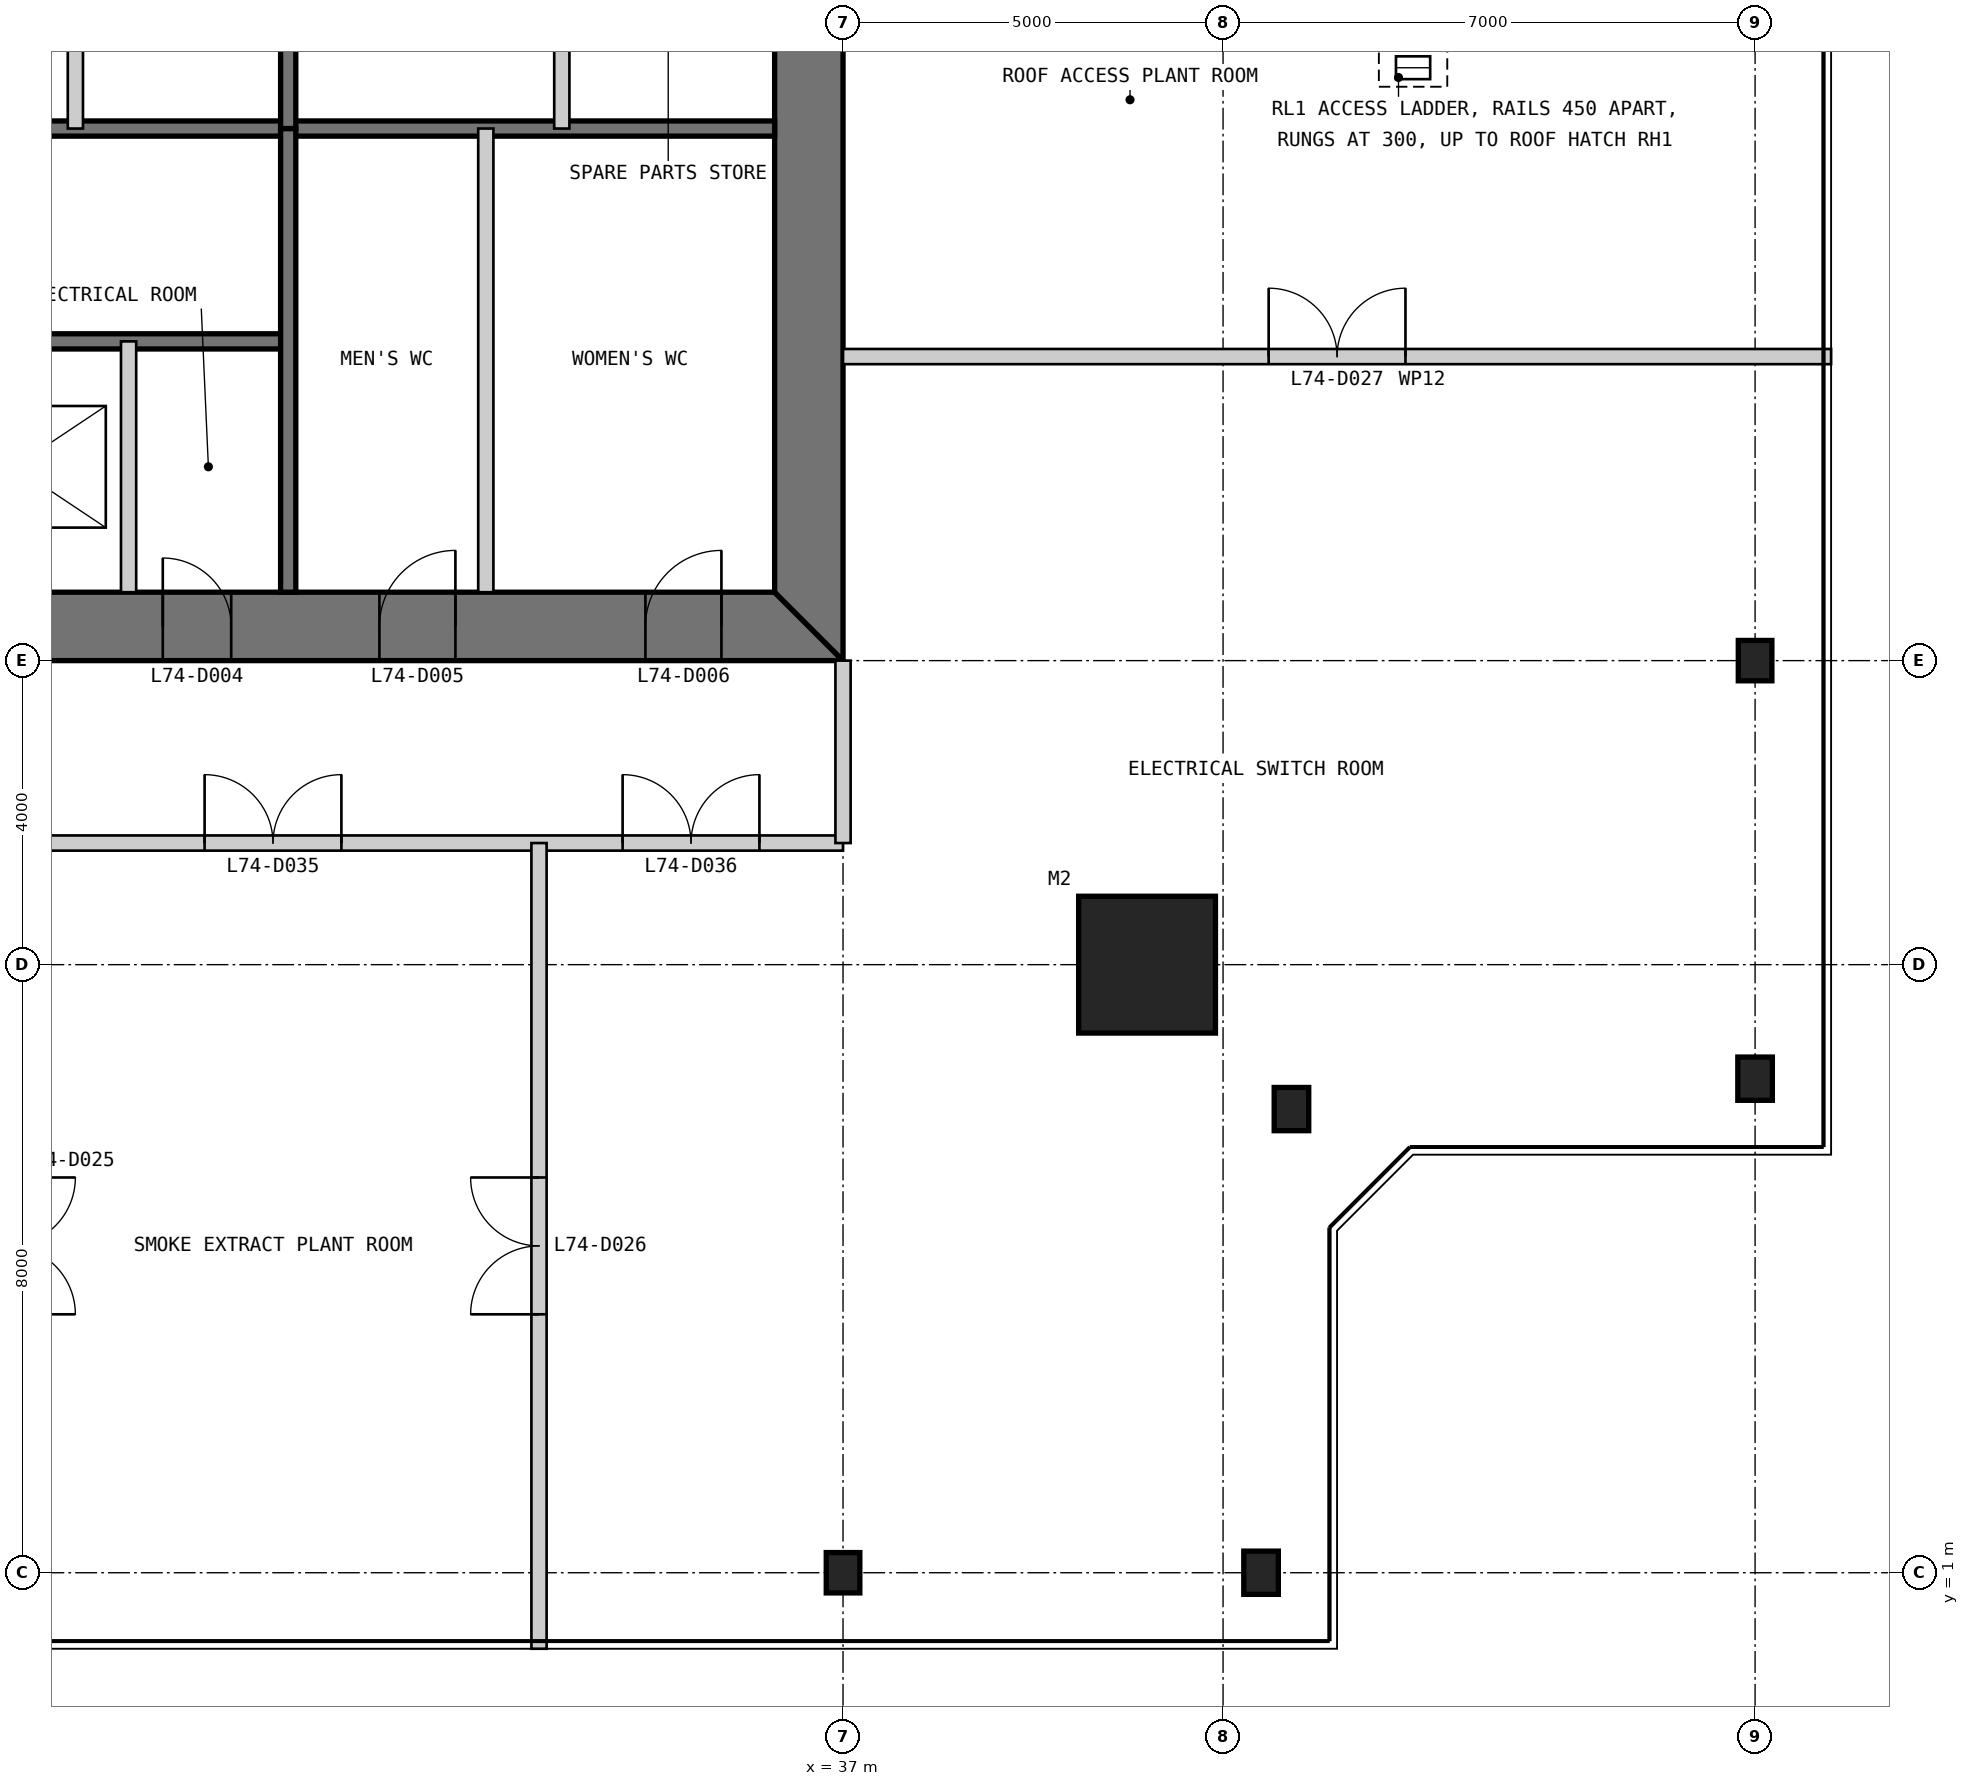
"""IFC4 building model, lengths in metres.
Left out: names, types, materials, properties, quantities, classifications, styles, units other than length and angle.
Written with IfcOpenShell. Run it as: python <this file> out.ifc"""

import sys

from ifc_helpers import new_model, si_unit, direction, frame, frame_2d, origin, origin_2d, place, context, subcontext, project, spatial, polyline, rectangle, i_section, outline, extrude, element, fill, save


model = new_model("IFC4")
c1 = context("Model", 3, precision=1e-05, world=origin(), true_north=direction((0.0, 1.0)))
c2 = subcontext(c1, "Body", "Model", "MODEL_VIEW")
j1 = project(units=[si_unit("LENGTHUNIT", "METRE"), si_unit("PLANEANGLEUNIT", "RADIAN")], contexts=[c1])
p1 = place(None, origin())
s1 = spatial("IfcSite", under=j1, at=p1, CompositionType="ELEMENT")
p2 = place(p1, origin())
s2 = spatial("IfcBuilding", under=s1, at=p2, CompositionType="ELEMENT")
p3 = place(p2, frame((0.0, 0.0, 307.8)))
s3 = spatial("IfcBuildingStorey", under=s2, at=p3, CompositionType="ELEMENT", Elevation=307.8)
p4 = place(p3, frame((41.0, 9.0, 0.0), z_axis=(0.0, 0.0, 1.0), x_axis=(1.0, 0.0, 0.0)))
e1 = element("IfcColumn", 1, at=p4, inside=s3, PredefinedType="COLUMN", context=c2, shape_type="SweptSolid", body=[
    extrude(rectangle(XDim=1.8, YDim=1.8, at=origin_2d()), origin(), (0.0, 0.0, 1.0), 5.75),
])
p5 = place(p3, frame((37.0, 1.0, 0.0), z_axis=(0.0, 0.0, 1.0), x_axis=(1.0, 0.0, 0.0)))
e2 = element("IfcColumn", 2, at=p5, inside=s3, PredefinedType="COLUMN", context=c2, shape_type="SweptSolid", body=[
    extrude(i_section(OverallWidth=0.442, OverallDepth=0.531, WebThickness=0.066, FlangeThickness=0.106, at=origin_2d()), origin(), (0.0, 0.0, 1.0), 5.75),
])
for number, where, z_axis, x_axis in (
    (3, (42.5, 1.0, 0.0), (0.0, 0.0, 1.0), (1.0, 0.0, 0.0)),
    (4, (42.9, 7.1, 0.0), (0.0, 0.0, 1.0), (1.0, 0.0, 0.0)),
    (5, (49.0, 7.5, 0.0), (0.0, 0.0, 1.0), (1.0, 0.0, 0.0)),
):
    element("IfcColumn", number, at=place(p3, frame(where, z_axis=z_axis, x_axis=x_axis)), inside=s3, PredefinedType="COLUMN", context=c2, shape_type="SweptSolid", body=[
        extrude(i_section(OverallWidth=0.455, OverallDepth=0.569, WebThickness=0.078, FlangeThickness=0.125, at=origin_2d()), origin(), (0.0, 0.0, 1.0), 5.75),
    ])
p6 = place(p3, frame((49.0, 13.0, 0.0), z_axis=(0.0, 0.0, 1.0), x_axis=(1.0, 0.0, 0.0)))
e6 = element("IfcColumn", 6, at=p6, inside=s3, PredefinedType="COLUMN", context=c2, shape_type="SweptSolid", body=[
    extrude(i_section(OverallWidth=0.442, OverallDepth=0.531, WebThickness=0.066, FlangeThickness=0.106, at=origin_2d()), origin(), (0.0, 0.0, 1.0), 5.75),
])
p7 = place(p3, frame((13.0, 13.45, 0.0), z_axis=(0.0, 0.0, 1.0), x_axis=(1.0, 0.0, 0.0)))
e7 = element("IfcWall", 7, at=p7, inside=s3, PredefinedType="SHEAR", context=c2, shape_type="SweptSolid", body=[
    extrude(outline(polyline([(0.0, -0.45), (24.0, -0.45), (23.1, 0.45), (0.9, 0.45), (0.0, -0.45)])), origin(), (0.0, 0.0, 1.0), 5.75),
])
p8 = place(p7, frame((4.9, 0.0, 0.0)))
e8 = element("IfcOpeningElement", 8, at=p8, cuts=e7, PredefinedType="OPENING", context=c2, shape_type="SweptSolid", body=[
    extrude(rectangle(XDim=1.0, YDim=2.2, at=frame_2d((0.5, 1.1))), frame((0.0, 0.46, 0.0), z_axis=(0.0, -1.0, 0.0), x_axis=(1.0, 0.0, 0.0)), (0.0, 0.0, 1.0), 0.92),
])
p9 = place(p7, frame((8.9, 0.0, 0.0)))
e9 = element("IfcOpeningElement", 9, at=p9, cuts=e7, PredefinedType="OPENING", context=c2, shape_type="SweptSolid", body=[
    extrude(rectangle(XDim=1.1, YDim=2.2, at=frame_2d((0.55, 1.1))), frame((0.0, 0.46, 0.0), z_axis=(0.0, -1.0, 0.0), x_axis=(1.0, 0.0, 0.0)), (0.0, 0.0, 1.0), 0.92),
])
p10 = place(p7, frame((15.05, 0.0, 0.0)))
e10 = element("IfcOpeningElement", 10, at=p10, cuts=e7, PredefinedType="OPENING", context=c2, shape_type="SweptSolid", body=[
    extrude(rectangle(XDim=0.9, YDim=2.2, at=frame_2d((0.45, 1.1))), frame((0.0, 0.46, 0.0), z_axis=(0.0, -1.0, 0.0), x_axis=(1.0, 0.0, 0.0)), (0.0, 0.0, 1.0), 0.92),
])
p11 = place(p7, frame((17.9, 0.0, 0.0)))
e11 = element("IfcOpeningElement", 11, at=p11, cuts=e7, PredefinedType="OPENING", context=c2, shape_type="SweptSolid", body=[
    extrude(rectangle(XDim=1.0, YDim=2.2, at=frame_2d((0.5, 1.1))), frame((0.0, 0.46, 0.0), z_axis=(0.0, -1.0, 0.0), x_axis=(1.0, 0.0, 0.0)), (0.0, 0.0, 1.0), 0.92),
])
p12 = place(p7, frame((21.4, 0.0, 0.0)))
e12 = element("IfcOpeningElement", 12, at=p12, cuts=e7, PredefinedType="OPENING", context=c2, shape_type="SweptSolid", body=[
    extrude(rectangle(XDim=1.0, YDim=2.2, at=frame_2d((0.5, 1.1))), frame((0.0, 0.46, 0.0), z_axis=(0.0, -1.0, 0.0), x_axis=(1.0, 0.0, 0.0)), (0.0, 0.0, 1.0), 0.92),
])
p13 = place(p3, frame((36.55, 13.9, 0.0), z_axis=(0.0, 0.0, 1.0), x_axis=(0.0, 1.0, 0.0)))
e13 = element("IfcWall", 13, at=p13, inside=s3, PredefinedType="SHEAR", context=c2, shape_type="SweptSolid", body=[
    extrude(outline(polyline([(-0.9, -0.45), (23.1, -0.45), (22.2, 0.45), (0.0, 0.45), (-0.9, -0.45)])), origin(), (0.0, 0.0, 1.0), 5.75),
])
p14 = place(p13, frame((20.2, 0.0, 0.0)))
e14 = element("IfcOpeningElement", 14, at=p14, cuts=e13, PredefinedType="OPENING", context=c2, shape_type="SweptSolid", body=[
    extrude(rectangle(XDim=1.0, YDim=2.2, at=frame_2d((0.5, 1.1))), frame((0.0, 0.46, 0.0), z_axis=(0.0, -1.0, 0.0), x_axis=(1.0, 0.0, 0.0)), (0.0, 0.0, 1.0), 0.92),
])
p15 = place(p13, frame((17.25, 0.0, 0.0)))
e15 = element("IfcOpeningElement", 15, at=p15, cuts=e13, PredefinedType="OPENING", context=c2, shape_type="SweptSolid", body=[
    extrude(rectangle(XDim=0.9, YDim=2.2, at=frame_2d((0.45, 1.1))), frame((0.0, 0.46, 0.0), z_axis=(0.0, -1.0, 0.0), x_axis=(1.0, 0.0, 0.0)), (0.0, 0.0, 1.0), 0.92),
])
p16 = place(p3, frame((20.3, 17.2, 0.0), z_axis=(0.0, 0.0, 1.0), x_axis=(1.0, 0.0, 0.0)))
e16 = element("IfcWall", 16, at=p16, inside=s3, PredefinedType="SOLIDWALL", context=c2, shape_type="SweptSolid", body=[
    extrude(rectangle(XDim=9.4, YDim=0.2, at=frame_2d((4.7, 0.0))), origin(), (0.0, 0.0, 1.0), 5.75),
])
p17 = place(p16, frame((0.25, 0.0, 0.0)))
e17 = element("IfcOpeningElement", 17, at=p17, cuts=e16, PredefinedType="OPENING", context=c2, shape_type="SweptSolid", body=[
    extrude(rectangle(XDim=1.0, YDim=2.2, at=frame_2d((0.5, 1.1))), frame((0.0, 0.11, 0.0), z_axis=(0.0, -1.0, 0.0), x_axis=(1.0, 0.0, 0.0)), (0.0, 0.0, 1.0), 0.22),
])
p18 = place(p3, frame((20.3, 20.0, 0.0), z_axis=(0.0, 0.0, 1.0), x_axis=(1.0, 0.0, 0.0)))
e18 = element("IfcWall", 18, at=p18, inside=s3, PredefinedType="SOLIDWALL", context=c2, shape_type="SweptSolid", body=[
    extrude(rectangle(XDim=15.8, YDim=0.2, at=frame_2d((7.9, 0.0))), origin(), (0.0, 0.0, 1.0), 5.75),
])
p19 = place(p3, frame((27.6, 13.9, 0.0), z_axis=(0.0, 0.0, 1.0), x_axis=(0.0, 1.0, 0.0)))
e19 = element("IfcWall", 19, at=p19, inside=s3, PredefinedType="PARTITIONING", context=c2, shape_type="SweptSolid", body=[
    extrude(rectangle(XDim=3.3, YDim=0.2, at=frame_2d((1.65, 0.0))), origin(), (0.0, 0.0, 1.0), 5.75),
])
p20 = place(p3, frame((29.7, 13.9, 0.0), z_axis=(0.0, 0.0, 1.0), x_axis=(0.0, 1.0, 0.0)))
e20 = element("IfcWall", 20, at=p20, inside=s3, PredefinedType="SOLIDWALL", context=c2, shape_type="SweptSolid", body=[
    extrude(rectangle(XDim=6.1, YDim=0.2, at=frame_2d((3.05, 0.0))), origin(), (0.0, 0.0, 1.0), 5.75),
])
p21 = place(p3, frame((32.3, 13.9, 0.0), z_axis=(0.0, 0.0, 1.0), x_axis=(0.0, 1.0, 0.0)))
e21 = element("IfcWall", 21, at=p21, inside=s3, PredefinedType="PARTITIONING", context=c2, shape_type="SweptSolid", body=[
    extrude(rectangle(XDim=6.1, YDim=0.2, at=frame_2d((3.05, 0.0))), origin(), (0.0, 0.0, 1.0), 5.75),
])
p22 = place(p3, frame((33.3, 36.1, 0.0), z_axis=(0.0, 0.0, 1.0), x_axis=(0.0, -1.0, 0.0)))
e22 = element("IfcWall", 22, at=p22, inside=s3, PredefinedType="PARTITIONING", context=c2, shape_type="SweptSolid", body=[
    extrude(rectangle(XDim=16.1, YDim=0.2, at=frame_2d((8.05, 0.0))), origin(), (0.0, 0.0, 1.0), 5.75),
])
p23 = place(p22, frame((9.65, 0.0, 0.0)))
e23 = element("IfcOpeningElement", 23, at=p23, cuts=e22, PredefinedType="OPENING", context=c2, shape_type="SweptSolid", body=[
    extrude(rectangle(XDim=0.9, YDim=2.2, at=frame_2d((0.45, 1.1))), frame((0.0, 0.11, 0.0), z_axis=(0.0, -1.0, 0.0), x_axis=(1.0, 0.0, 0.0)), (0.0, 0.0, 1.0), 0.22),
])
p24 = place(p22, frame((13.65, 0.0, 0.0)))
e24 = element("IfcOpeningElement", 24, at=p24, cuts=e22, PredefinedType="OPENING", context=c2, shape_type="SweptSolid", body=[
    extrude(rectangle(XDim=0.9, YDim=2.2, at=frame_2d((0.45, 1.1))), frame((0.0, 0.11, 0.0), z_axis=(0.0, -1.0, 0.0), x_axis=(1.0, 0.0, 0.0)), (0.0, 0.0, 1.0), 0.22),
])
p25 = place(p3, frame((29.7, 36.1, 0.0), z_axis=(0.0, 0.0, 1.0), x_axis=(0.0, -1.0, 0.0)))
e25 = element("IfcWall", 25, at=p25, inside=s3, PredefinedType="SOLIDWALL", context=c2, shape_type="SweptSolid", body=[
    extrude(rectangle(XDim=16.1, YDim=0.2, at=frame_2d((8.05, 0.0))), origin(), (0.0, 0.0, 1.0), 5.75),
])
p26 = place(p25, frame((10.65, 0.0, 0.0)))
e26 = element("IfcOpeningElement", 26, at=p26, cuts=e25, PredefinedType="OPENING", context=c2, shape_type="SweptSolid", body=[
    extrude(rectangle(XDim=0.9, YDim=2.2, at=frame_2d((0.45, 1.1))), frame((0.0, 0.11, 0.0), z_axis=(0.0, -1.0, 0.0), x_axis=(1.0, 0.0, 0.0)), (0.0, 0.0, 1.0), 0.22),
])
p27 = place(p3, frame((26.9, 30.0, 0.0), z_axis=(0.0, 0.0, 1.0), x_axis=(0.0, -1.0, 0.0)))
e27 = element("IfcWall", 27, at=p27, inside=s3, PredefinedType="PARTITIONING", context=c2, shape_type="SweptSolid", body=[
    extrude(rectangle(XDim=10.0, YDim=0.2, at=frame_2d((5.0, 0.0))), origin(), (0.0, 0.0, 1.0), 5.75),
])
p28 = place(p3, frame((13.0, 10.6, 0.0), z_axis=(0.0, 0.0, 1.0), x_axis=(1.0, 0.0, 0.0)))
e28 = element("IfcWall", 28, at=p28, inside=s3, PredefinedType="PARTITIONING", context=c2, shape_type="SweptSolid", body=[
    extrude(rectangle(XDim=24.0, YDim=0.2, at=frame_2d((12.0, 0.0))), origin(), (0.0, 0.0, 1.0), 5.75),
])
p29 = place(p28, frame((1.05, 0.0, 0.0)))
e29 = element("IfcOpeningElement", 29, at=p29, cuts=e28, PredefinedType="OPENING", context=c2, shape_type="SweptSolid", body=[
    extrude(rectangle(XDim=0.9, YDim=2.2, at=frame_2d((0.45, 1.1))), frame((0.0, 0.11, 0.0), z_axis=(0.0, -1.0, 0.0), x_axis=(1.0, 0.0, 0.0)), (0.0, 0.0, 1.0), 0.22),
])
p30 = place(p28, frame((7.1, 0.0, 0.0)))
e30 = element("IfcOpeningElement", 30, at=p30, cuts=e28, PredefinedType="OPENING", context=c2, shape_type="SweptSolid", body=[
    extrude(rectangle(XDim=1.8, YDim=2.4, at=frame_2d((0.9, 1.2))), frame((0.0, 0.11, 0.0), z_axis=(0.0, -1.0, 0.0), x_axis=(1.0, 0.0, 0.0)), (0.0, 0.0, 1.0), 0.22),
])
p31 = place(p28, frame((15.6, 0.0, 0.0)))
e31 = element("IfcOpeningElement", 31, at=p31, cuts=e28, PredefinedType="OPENING", context=c2, shape_type="SweptSolid", body=[
    extrude(rectangle(XDim=1.8, YDim=2.4, at=frame_2d((0.9, 1.2))), frame((0.0, 0.11, 0.0), z_axis=(0.0, -1.0, 0.0), x_axis=(1.0, 0.0, 0.0)), (0.0, 0.0, 1.0), 0.22),
])
p32 = place(p28, frame((21.1, 0.0, 0.0)))
e32 = element("IfcOpeningElement", 32, at=p32, cuts=e28, PredefinedType="OPENING", context=c2, shape_type="SweptSolid", body=[
    extrude(rectangle(XDim=1.8, YDim=2.4, at=frame_2d((0.9, 1.2))), frame((0.0, 0.11, 0.0), z_axis=(0.0, -1.0, 0.0), x_axis=(1.0, 0.0, 0.0)), (0.0, 0.0, 1.0), 0.22),
])
p33 = place(p3, frame((37.0, 10.6, 0.0), z_axis=(0.0, 0.0, 1.0), x_axis=(0.0, 1.0, 0.0)))
e33 = element("IfcWall", 33, at=p33, inside=s3, PredefinedType="PARTITIONING", context=c2, shape_type="SweptSolid", body=[
    extrude(rectangle(XDim=2.4, YDim=0.2, at=frame_2d((1.2, 0.0))), origin(), (0.0, 0.0, 1.0), 4.802),
])
p34 = place(p3, frame((33.0, 0.0, 0.0), z_axis=(0.0, 0.0, 1.0), x_axis=(0.0, 1.0, 0.0)))
e34 = element("IfcWall", 34, at=p34, inside=s3, PredefinedType="PARTITIONING", context=c2, shape_type="SweptSolid", body=[
    extrude(rectangle(XDim=10.6, YDim=0.2, at=frame_2d((5.3, 0.0))), origin(), (0.0, 0.0, 1.0), 5.75),
])
p35 = place(p34, frame((4.4, 0.0, 0.0)))
e35 = element("IfcOpeningElement", 35, at=p35, cuts=e34, PredefinedType="OPENING", context=c2, shape_type="SweptSolid", body=[
    extrude(rectangle(XDim=1.8, YDim=2.4, at=frame_2d((0.9, 1.2))), frame((0.0, 0.11, 0.0), z_axis=(0.0, -1.0, 0.0), x_axis=(1.0, 0.0, 0.0)), (0.0, 0.0, 1.0), 0.22),
])
p36 = place(p3, frame((37.0, 17.0, 0.0), z_axis=(0.0, 0.0, 1.0), x_axis=(1.0, 0.0, 0.0)))
e36 = element("IfcWall", 36, at=p36, inside=s3, PredefinedType="PARTITIONING", context=c2, shape_type="SweptSolid", body=[
    extrude(rectangle(XDim=13.0, YDim=0.2, at=frame_2d((6.5, 0.0))), origin(), (0.0, 0.0, 1.0), 5.75),
])
p37 = place(p36, frame((5.6, 0.0, 0.0)))
e37 = element("IfcOpeningElement", 37, at=p37, cuts=e36, PredefinedType="OPENING", context=c2, shape_type="SweptSolid", body=[
    extrude(rectangle(XDim=1.8, YDim=2.4, at=frame_2d((0.9, 1.2))), frame((0.0, 0.11, 0.0), z_axis=(0.0, -1.0, 0.0), x_axis=(1.0, 0.0, 0.0)), (0.0, 0.0, 1.0), 0.22),
])
p38 = place(p10, origin())
e38 = element("IfcDoor", 38, at=p38, inside=s3, OperationType="SINGLE_SWING_LEFT", PredefinedType="DOOR", context=c2, shape_type="SweptSolid", body=[
    extrude(rectangle(XDim=0.9, YDim=2.2, at=frame_2d((0.45, 1.1))), frame((0.0, 0.025, 0.0), z_axis=(0.0, -1.0, 0.0), x_axis=(1.0, 0.0, 0.0)), (0.0, 0.0, 1.0), 0.05),
    extrude(outline(polyline([(0.0, 0.0), (0.04, 0.0), (0.04, 2.16), (0.86, 2.16), (0.86, 0.0), (0.9, 0.0), (0.9, 2.2), (0.0, 2.2), (0.0, 0.0)])), frame((0.0, 0.3, 0.0), z_axis=(0.0, -1.0, 0.0), x_axis=(1.0, 0.0, 0.0)), (0.0, 0.0, 1.0), 0.6),
])
fill(e10, e38)
p39 = place(p11, origin())
e39 = element("IfcDoor", 39, at=p39, inside=s3, OperationType="SINGLE_SWING_RIGHT", PredefinedType="DOOR", context=c2, shape_type="SweptSolid", body=[
    extrude(rectangle(XDim=1.0, YDim=2.2, at=frame_2d((0.5, 1.1))), frame((0.0, 0.025, 0.0), z_axis=(0.0, -1.0, 0.0), x_axis=(1.0, 0.0, 0.0)), (0.0, 0.0, 1.0), 0.05),
    extrude(outline(polyline([(0.0, 0.0), (0.04, 0.0), (0.04, 2.16), (0.96, 2.16), (0.96, 0.0), (1.0, 0.0), (1.0, 2.2), (0.0, 2.2), (0.0, 0.0)])), frame((0.0, 0.3, 0.0), z_axis=(0.0, -1.0, 0.0), x_axis=(1.0, 0.0, 0.0)), (0.0, 0.0, 1.0), 0.6),
])
fill(e11, e39)
p40 = place(p12, origin())
e40 = element("IfcDoor", 40, at=p40, inside=s3, OperationType="SINGLE_SWING_RIGHT", PredefinedType="DOOR", context=c2, shape_type="SweptSolid", body=[
    extrude(rectangle(XDim=1.0, YDim=2.2, at=frame_2d((0.5, 1.1))), frame((0.0, 0.025, 0.0), z_axis=(0.0, -1.0, 0.0), x_axis=(1.0, 0.0, 0.0)), (0.0, 0.0, 1.0), 0.05),
    extrude(outline(polyline([(0.0, 0.0), (0.04, 0.0), (0.04, 2.16), (0.96, 2.16), (0.96, 0.0), (1.0, 0.0), (1.0, 2.2), (0.0, 2.2), (0.0, 0.0)])), frame((0.0, 0.3, 0.0), z_axis=(0.0, -1.0, 0.0), x_axis=(1.0, 0.0, 0.0)), (0.0, 0.0, 1.0), 0.6),
])
fill(e12, e40)
p41 = place(p35, origin())
e41 = element("IfcDoor", 41, at=p41, inside=s3, OperationType="DOUBLE_DOOR_SINGLE_SWING", PredefinedType="DOOR", context=c2, shape_type="SweptSolid", body=[
    extrude(rectangle(XDim=1.8, YDim=2.4, at=frame_2d((0.9, 1.2))), frame((0.0, 0.025, 0.0), z_axis=(0.0, -1.0, 0.0), x_axis=(1.0, 0.0, 0.0)), (0.0, 0.0, 1.0), 0.05),
])
fill(e35, e41)
p42 = place(p37, origin())
e42 = element("IfcDoor", 42, at=p42, inside=s3, OperationType="DOUBLE_DOOR_SINGLE_SWING", PredefinedType="DOOR", context=c2, shape_type="SweptSolid", body=[
    extrude(rectangle(XDim=1.8, YDim=2.4, at=frame_2d((0.9, 1.2))), frame((0.0, 0.025, 0.0), z_axis=(0.0, -1.0, 0.0), x_axis=(1.0, 0.0, 0.0)), (0.0, 0.0, 1.0), 0.05),
])
fill(e37, e42)
p43 = place(p31, origin())
e43 = element("IfcDoor", 43, at=p43, inside=s3, OperationType="DOUBLE_DOOR_SINGLE_SWING", PredefinedType="DOOR", context=c2, shape_type="SweptSolid", body=[
    extrude(rectangle(XDim=1.8, YDim=2.4, at=frame_2d((0.9, 1.2))), frame((0.0, 0.025, 0.0), z_axis=(0.0, -1.0, 0.0), x_axis=(1.0, 0.0, 0.0)), (0.0, 0.0, 1.0), 0.05),
])
fill(e31, e43)
p44 = place(p32, origin())
e44 = element("IfcDoor", 44, at=p44, inside=s3, OperationType="DOUBLE_DOOR_SINGLE_SWING", PredefinedType="DOOR", context=c2, shape_type="SweptSolid", body=[
    extrude(rectangle(XDim=1.8, YDim=2.4, at=frame_2d((0.9, 1.2))), frame((0.0, 0.025, 0.0), z_axis=(0.0, -1.0, 0.0), x_axis=(1.0, 0.0, 0.0)), (0.0, 0.0, 1.0), 0.05),
])
fill(e32, e44)
save(model, sys.argv[1])
